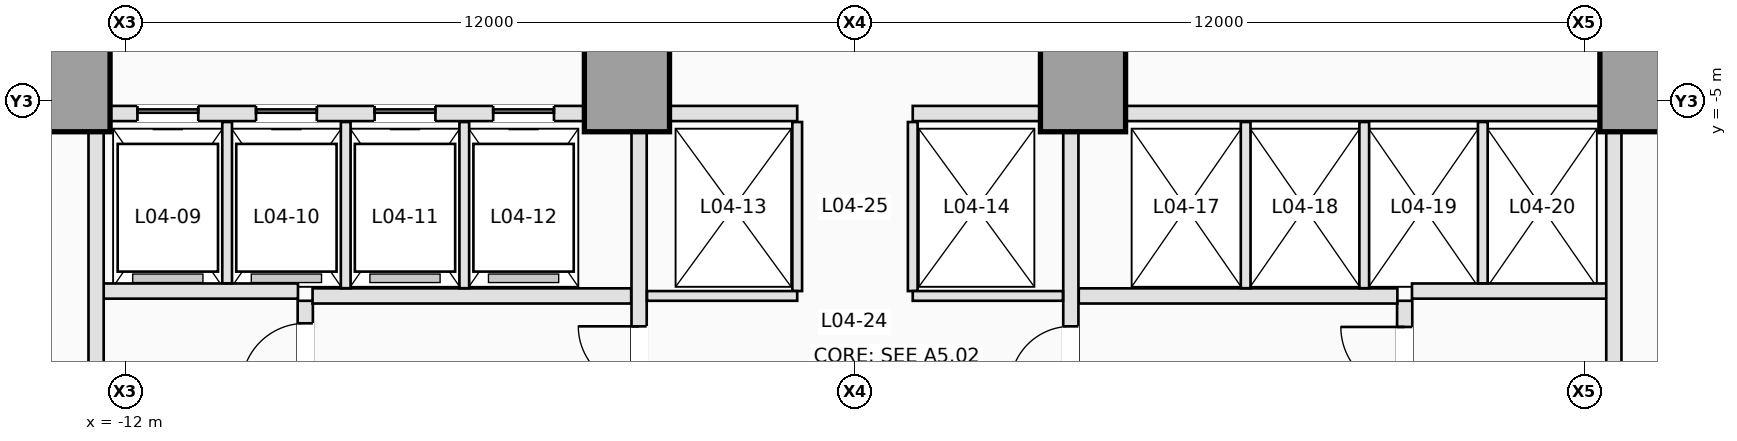
"""IFC4 building model, lengths in metres.
Left out: names, types, materials, properties, quantities, classifications, styles, units other than length and angle.
Written with IfcOpenShell. Run it as: python <this file> out.ifc"""

import sys

from ifc_helpers import new_model, si_unit, direction, frame, frame_2d, origin, origin_2d, place, context, subcontext, project, spatial, rectangle, extrude, element, fill, save


model = new_model("IFC4")
c1 = context("Model", 3, precision=1e-05, world=origin(), true_north=direction((0.0, 1.0)))
c2 = subcontext(c1, "Body", "Model", "MODEL_VIEW")
j1 = project(units=[si_unit("LENGTHUNIT", "METRE"), si_unit("PLANEANGLEUNIT", "RADIAN")], contexts=[c1])
p1 = place(None, origin())
s1 = spatial("IfcSite", under=j1, at=p1, CompositionType="ELEMENT")
p2 = place(p1, origin())
s2 = spatial("IfcBuilding", under=s1, at=p2, CompositionType="ELEMENT")
p3 = place(p2, frame((0.0, 0.0, 18.5)))
s3 = spatial("IfcBuildingStorey", under=s2, at=p3, CompositionType="ELEMENT", Elevation=18.5)
for number, where, z_axis, x_axis in (
    (1, (-12.95, -4.8, 0.0), (0.0, 0.0, 1.0), (1.0, 0.0, 0.0)),
    (2, (-3.75, -4.8, 0.0), (0.0, 0.0, 1.0), (1.0, 0.0, 0.0)),
    (3, (3.75, -4.8, 0.0), (0.0, 0.0, 1.0), (1.0, 0.0, 0.0)),
    (4, (12.95, -4.8, 0.0), (0.0, 0.0, 1.0), (1.0, 0.0, 0.0)),
):
    element("IfcColumn", number, at=place(p3, frame(where, z_axis=z_axis, x_axis=x_axis)), inside=s3, PredefinedType="COLUMN", context=c2, shape_type="SweptSolid", body=[
        extrude(rectangle(XDim=1.4, YDim=1.4, at=origin_2d()), origin(), (0.0, 0.0, 1.0), 4.5),
    ])
p4 = place(p3, frame((-9.04, -10.18, 0.0), z_axis=(0.0, 0.0, 1.0), x_axis=(0.0, 1.0, 0.0)))
e5 = element("IfcWall", 5, at=p4, inside=s3, PredefinedType="PARTITIONING", context=c2, shape_type="SweptSolid", body=[
    extrude(rectangle(XDim=1.9, YDim=0.25, at=frame_2d((0.95, 0.0))), origin(), (0.0, 0.0, 1.0), 4.08),
])
p5 = place(p4, frame((0.48, 0.0, 0.0)))
e6 = element("IfcOpeningElement", 6, at=p5, cuts=e5, PredefinedType="OPENING", context=c2, shape_type="SweptSolid", body=[
    extrude(rectangle(XDim=1.05, YDim=2.15, at=frame_2d((0.525, 1.075))), frame((0.0, 0.135, 0.0), z_axis=(0.0, -1.0, 0.0), x_axis=(1.0, 0.0, 0.0)), (0.0, 0.0, 1.0), 0.27),
])
p6 = place(p3, frame((9.04, -10.18, 0.0), z_axis=(0.0, 0.0, 1.0), x_axis=(0.0, 1.0, 0.0)))
e7 = element("IfcWall", 7, at=p6, inside=s3, PredefinedType="PARTITIONING", context=c2, shape_type="SweptSolid", body=[
    extrude(rectangle(XDim=1.9, YDim=0.25, at=frame_2d((0.95, 0.0))), origin(), (0.0, 0.0, 1.0), 4.08),
])
p7 = place(p6, frame((0.42, 0.0, 0.0)))
e8 = element("IfcOpeningElement", 8, at=p7, cuts=e7, PredefinedType="OPENING", context=c2, shape_type="SweptSolid", body=[
    extrude(rectangle(XDim=1.05, YDim=2.15, at=frame_2d((0.525, 1.075))), frame((0.0, 0.135, 0.0), z_axis=(0.0, -1.0, 0.0), x_axis=(1.0, 0.0, 0.0)), (0.0, 0.0, 1.0), 0.27),
])
for number, where, z_axis, x_axis in (
    (9, (-12.38, -8.12, 0.0), (0.0, 0.0, 1.0), (1.0, 0.0, 0.0)),
    (10, (9.16, -8.12, 0.0), (0.0, 0.0, 1.0), (1.0, 0.0, 0.0)),
):
    element("IfcWall", number, at=place(p3, frame(where, z_axis=z_axis, x_axis=x_axis)), inside=s3, PredefinedType="PARTITIONING", context=c2, shape_type="SweptSolid", body=[
        extrude(rectangle(XDim=3.22, YDim=0.25, at=frame_2d((1.61, 0.0))), origin(), (0.0, 0.0, 1.0), 4.08),
    ])
for number, where, z_axis, x_axis in (
    (11, (-12.48, -10.18, 0.0), (0.0, 0.0, 1.0), (0.0, 1.0, 0.0)),
    (12, (12.48, -10.18, 0.0), (0.0, 0.0, 1.0), (0.0, 1.0, 0.0)),
):
    element("IfcWall", number, at=place(p3, frame(where, z_axis=z_axis, x_axis=x_axis)), inside=s3, PredefinedType="PARTITIONING", context=c2, shape_type="SweptSolid", body=[
        extrude(rectangle(XDim=4.678, YDim=0.25, at=frame_2d((2.339, 0.0))), origin(), (0.0, 0.0, 1.0), 4.08),
    ])
for number, where, z_axis, x_axis in (
    (13, (-8.92, -8.2, 0.0), (0.0, 0.0, 1.0), (1.0, 0.0, 0.0)),
    (14, (3.68, -8.2, 0.0), (0.0, 0.0, 1.0), (1.0, 0.0, 0.0)),
):
    element("IfcWall", number, at=place(p3, frame(where, z_axis=z_axis, x_axis=x_axis)), inside=s3, PredefinedType="PARTITIONING", context=c2, shape_type="SweptSolid", body=[
        extrude(rectangle(XDim=5.24, YDim=0.25, at=frame_2d((2.62, 0.0))), origin(), (0.0, 0.0, 1.0), 4.08),
    ])
p8 = place(p3, frame((-3.55, -15.648, 0.0), z_axis=(0.0, 0.0, 1.0), x_axis=(0.0, 1.0, 0.0)))
e15 = element("IfcWall", 15, at=p8, inside=s3, PredefinedType="PARTITIONING", context=c2, shape_type="SweptSolid", body=[
    extrude(rectangle(XDim=10.146, YDim=0.25, at=frame_2d((5.073, 0.0))), origin(), (0.0, 0.0, 1.0), 4.08),
])
p9 = place(p8, frame((5.948, 0.0, 0.0)))
e16 = element("IfcOpeningElement", 16, at=p9, cuts=e15, PredefinedType="OPENING", context=c2, shape_type="SweptSolid", body=[
    extrude(rectangle(XDim=1.0, YDim=2.15, at=frame_2d((0.5, 1.075))), frame((0.0, 0.135, 0.0), z_axis=(0.0, -1.0, 0.0), x_axis=(1.0, 0.0, 0.0)), (0.0, 0.0, 1.0), 0.27),
])
p10 = place(p3, frame((3.55, -15.648, 0.0), z_axis=(0.0, 0.0, 1.0), x_axis=(0.0, 1.0, 0.0)))
e17 = element("IfcWall", 17, at=p10, inside=s3, PredefinedType="PARTITIONING", context=c2, shape_type="SweptSolid", body=[
    extrude(rectangle(XDim=10.146, YDim=0.25, at=frame_2d((5.073, 0.0))), origin(), (0.0, 0.0, 1.0), 4.08),
])
p11 = place(p10, frame((5.948, 0.0, 0.0)))
e18 = element("IfcOpeningElement", 18, at=p11, cuts=e17, PredefinedType="OPENING", context=c2, shape_type="SweptSolid", body=[
    extrude(rectangle(XDim=1.0, YDim=2.15, at=frame_2d((0.5, 1.075))), frame((0.0, 0.135, 0.0), z_axis=(0.0, -1.0, 0.0), x_axis=(1.0, 0.0, 0.0)), (0.0, 0.0, 1.0), 0.27),
])
p12 = place(p3, frame((-12.248, -5.2, 0.0), z_axis=(0.0, 0.0, 1.0), x_axis=(1.0, 0.0, 0.0)))
e19 = element("IfcWall", 19, at=p12, inside=s3, PredefinedType="PARTITIONING", context=c2, shape_type="SweptSolid", body=[
    extrude(rectangle(XDim=7.796, YDim=0.25, at=frame_2d((3.898, 0.0))), origin(), (0.0, 0.0, 1.0), 4.08),
])
p13 = place(p12, frame((0.448, 0.0, 0.0)))
e20 = element("IfcOpeningElement", 20, at=p13, cuts=e19, PredefinedType="OPENING", context=c2, shape_type="SweptSolid", body=[
    extrude(rectangle(XDim=1.0, YDim=2.15, at=frame_2d((0.5, 1.075))), frame((0.0, 0.135, 0.0), z_axis=(0.0, -1.0, 0.0), x_axis=(1.0, 0.0, 0.0)), (0.0, 0.0, 1.0), 0.27),
])
p14 = place(p12, frame((2.398, 0.0, 0.0)))
e21 = element("IfcOpeningElement", 21, at=p14, cuts=e19, PredefinedType="OPENING", context=c2, shape_type="SweptSolid", body=[
    extrude(rectangle(XDim=1.0, YDim=2.15, at=frame_2d((0.5, 1.075))), frame((0.0, 0.135, 0.0), z_axis=(0.0, -1.0, 0.0), x_axis=(1.0, 0.0, 0.0)), (0.0, 0.0, 1.0), 0.27),
])
p15 = place(p12, frame((4.348, 0.0, 0.0)))
e22 = element("IfcOpeningElement", 22, at=p15, cuts=e19, PredefinedType="OPENING", context=c2, shape_type="SweptSolid", body=[
    extrude(rectangle(XDim=1.0, YDim=2.15, at=frame_2d((0.5, 1.075))), frame((0.0, 0.135, 0.0), z_axis=(0.0, -1.0, 0.0), x_axis=(1.0, 0.0, 0.0)), (0.0, 0.0, 1.0), 0.27),
])
p16 = place(p12, frame((6.298, 0.0, 0.0)))
e23 = element("IfcOpeningElement", 23, at=p16, cuts=e19, PredefinedType="OPENING", context=c2, shape_type="SweptSolid", body=[
    extrude(rectangle(XDim=1.0, YDim=2.15, at=frame_2d((0.5, 1.075))), frame((0.0, 0.135, 0.0), z_axis=(0.0, -1.0, 0.0), x_axis=(1.0, 0.0, 0.0)), (0.0, 0.0, 1.0), 0.27),
])
p17 = place(p3, frame((4.452, -5.2, 0.0), z_axis=(0.0, 0.0, 1.0), x_axis=(1.0, 0.0, 0.0)))
e24 = element("IfcWall", 24, at=p17, inside=s3, PredefinedType="PARTITIONING", context=c2, shape_type="SweptSolid", body=[
    extrude(rectangle(XDim=7.796, YDim=0.25, at=frame_2d((3.898, 0.0))), origin(), (0.0, 0.0, 1.0), 4.08),
])
for number, where, z_axis, x_axis in (
    (25, (-3.048, -5.2, 0.0), (0.0, 0.0, 1.0), (1.0, 0.0, 0.0)),
    (26, (0.95, -5.2, 0.0), (0.0, 0.0, 1.0), (1.0, 0.0, 0.0)),
):
    element("IfcWall", number, at=place(p3, frame(where, z_axis=z_axis, x_axis=x_axis)), inside=s3, PredefinedType="PARTITIONING", context=c2, shape_type="SweptSolid", body=[
        extrude(rectangle(XDim=2.098, YDim=0.25, at=frame_2d((1.049, 0.0))), origin(), (0.0, 0.0, 1.0), 4.08),
    ])
p18 = place(p3, frame((-10.325, -7.993, 0.0), z_axis=(0.0, 0.0, 1.0), x_axis=(0.0, 1.0, 0.0)))
e27 = element("IfcWall", 27, at=p18, inside=s3, PredefinedType="PARTITIONING", context=c2, shape_type="SweptSolid", body=[
    extrude(rectangle(XDim=2.653, YDim=0.16, at=frame_2d((1.326, 0.0))), origin(), (0.0, 0.0, 1.0), 4.08),
])
for number, where, z_axis, x_axis in (
    (28, (-8.375, -8.073, 0.0), (0.0, 0.0, 1.0), (0.0, 1.0, 0.0)),
    (29, (-6.425, -8.073, 0.0), (0.0, 0.0, 1.0), (0.0, 1.0, 0.0)),
    (30, (6.425, -8.073, 0.0), (0.0, 0.0, 1.0), (0.0, 1.0, 0.0)),
    (31, (8.375, -8.073, 0.0), (0.0, 0.0, 1.0), (0.0, 1.0, 0.0)),
):
    element("IfcWall", number, at=place(p3, frame(where, z_axis=z_axis, x_axis=x_axis)), inside=s3, PredefinedType="PARTITIONING", context=c2, shape_type="SweptSolid", body=[
        extrude(rectangle(XDim=2.733, YDim=0.16, at=frame_2d((1.366, 0.0))), origin(), (0.0, 0.0, 1.0), 4.08),
    ])
p19 = place(p3, frame((10.325, -7.993, 0.0), z_axis=(0.0, 0.0, 1.0), x_axis=(0.0, 1.0, 0.0)))
e32 = element("IfcWall", 32, at=p19, inside=s3, PredefinedType="PARTITIONING", context=c2, shape_type="SweptSolid", body=[
    extrude(rectangle(XDim=2.653, YDim=0.16, at=frame_2d((1.326, 0.0))), origin(), (0.0, 0.0, 1.0), 4.08),
])
for number, where, z_axis, x_axis in (
    (33, (-0.95, -8.12, 0.0), (0.0, 0.0, 1.0), (0.0, 1.0, 0.0)),
    (34, (0.95, -8.12, 0.0), (0.0, 0.0, 1.0), (0.0, 1.0, 0.0)),
):
    element("IfcWall", number, at=place(p3, frame(where, z_axis=z_axis, x_axis=x_axis)), inside=s3, PredefinedType="PARTITIONING", context=c2, shape_type="SweptSolid", body=[
        extrude(rectangle(XDim=2.78, YDim=0.16, at=frame_2d((1.39, 0.0))), origin(), (0.0, 0.0, 1.0), 4.08),
    ])
for number, where, z_axis, x_axis in (
    (35, (-3.42, -8.2, 0.0), (0.0, 0.0, 1.0), (1.0, 0.0, 0.0)),
    (36, (0.95, -8.2, 0.0), (0.0, 0.0, 1.0), (1.0, 0.0, 0.0)),
):
    element("IfcWall", number, at=place(p3, frame(where, z_axis=z_axis, x_axis=x_axis)), inside=s3, PredefinedType="PARTITIONING", context=c2, shape_type="SweptSolid", body=[
        extrude(rectangle(XDim=2.47, YDim=0.16, at=frame_2d((1.235, 0.0))), origin(), (0.0, 0.0, 1.0), 4.08),
    ])
p20 = place(p13, origin())
e37 = element("IfcDoor", 37, at=p20, inside=s3, OperationType="SLIDING_TO_LEFT", PredefinedType="DOOR", context=c2, shape_type="SweptSolid", body=[
    extrude(rectangle(XDim=1.0, YDim=2.15, at=frame_2d((0.5, 1.075))), frame((0.0, 0.025, 0.0), z_axis=(0.0, -1.0, 0.0), x_axis=(1.0, 0.0, 0.0)), (0.0, 0.0, 1.0), 0.05),
])
fill(e20, e37)
p21 = place(p14, origin())
e38 = element("IfcDoor", 38, at=p21, inside=s3, OperationType="SLIDING_TO_LEFT", PredefinedType="DOOR", context=c2, shape_type="SweptSolid", body=[
    extrude(rectangle(XDim=1.0, YDim=2.15, at=frame_2d((0.5, 1.075))), frame((0.0, 0.025, 0.0), z_axis=(0.0, -1.0, 0.0), x_axis=(1.0, 0.0, 0.0)), (0.0, 0.0, 1.0), 0.05),
])
fill(e21, e38)
p22 = place(p15, origin())
e39 = element("IfcDoor", 39, at=p22, inside=s3, OperationType="SLIDING_TO_LEFT", PredefinedType="DOOR", context=c2, shape_type="SweptSolid", body=[
    extrude(rectangle(XDim=1.0, YDim=2.15, at=frame_2d((0.5, 1.075))), frame((0.0, 0.025, 0.0), z_axis=(0.0, -1.0, 0.0), x_axis=(1.0, 0.0, 0.0)), (0.0, 0.0, 1.0), 0.05),
])
fill(e22, e39)
p23 = place(p16, origin())
e40 = element("IfcDoor", 40, at=p23, inside=s3, OperationType="SLIDING_TO_LEFT", PredefinedType="DOOR", context=c2, shape_type="SweptSolid", body=[
    extrude(rectangle(XDim=1.0, YDim=2.15, at=frame_2d((0.5, 1.075))), frame((0.0, 0.025, 0.0), z_axis=(0.0, -1.0, 0.0), x_axis=(1.0, 0.0, 0.0)), (0.0, 0.0, 1.0), 0.05),
])
fill(e23, e40)
p24 = place(p5, origin())
e41 = element("IfcDoor", 41, at=p24, inside=s3, OperationType="SINGLE_SWING_LEFT", PredefinedType="DOOR", context=c2, shape_type="SweptSolid", body=[
    extrude(rectangle(XDim=1.05, YDim=2.15, at=frame_2d((0.525, 1.075))), frame((0.0, 0.025, 0.0), z_axis=(0.0, -1.0, 0.0), x_axis=(1.0, 0.0, 0.0)), (0.0, 0.0, 1.0), 0.05),
])
fill(e6, e41)
p25 = place(p7, origin())
e42 = element("IfcDoor", 42, at=p25, inside=s3, OperationType="SINGLE_SWING_RIGHT", PredefinedType="DOOR", context=c2, shape_type="SweptSolid", body=[
    extrude(rectangle(XDim=1.05, YDim=2.15, at=frame_2d((0.525, 1.075))), frame((0.0, 0.025, 0.0), z_axis=(0.0, -1.0, 0.0), x_axis=(1.0, 0.0, 0.0)), (0.0, 0.0, 1.0), 0.05),
])
fill(e8, e42)
p26 = place(p9, origin())
e43 = element("IfcDoor", 43, at=p26, inside=s3, OperationType="SINGLE_SWING_RIGHT", PredefinedType="DOOR", context=c2, shape_type="SweptSolid", body=[
    extrude(rectangle(XDim=1.0, YDim=2.15, at=frame_2d((0.5, 1.075))), frame((0.0, 0.025, 0.0), z_axis=(0.0, -1.0, 0.0), x_axis=(1.0, 0.0, 0.0)), (0.0, 0.0, 1.0), 0.05),
])
fill(e16, e43)
p27 = place(p11, origin())
e44 = element("IfcDoor", 44, at=p27, inside=s3, OperationType="SINGLE_SWING_LEFT", PredefinedType="DOOR", context=c2, shape_type="SweptSolid", body=[
    extrude(rectangle(XDim=1.0, YDim=2.15, at=frame_2d((0.5, 1.075))), frame((0.0, 0.025, 0.0), z_axis=(0.0, -1.0, 0.0), x_axis=(1.0, 0.0, 0.0)), (0.0, 0.0, 1.0), 0.05),
])
fill(e18, e44)
save(model, sys.argv[1])
